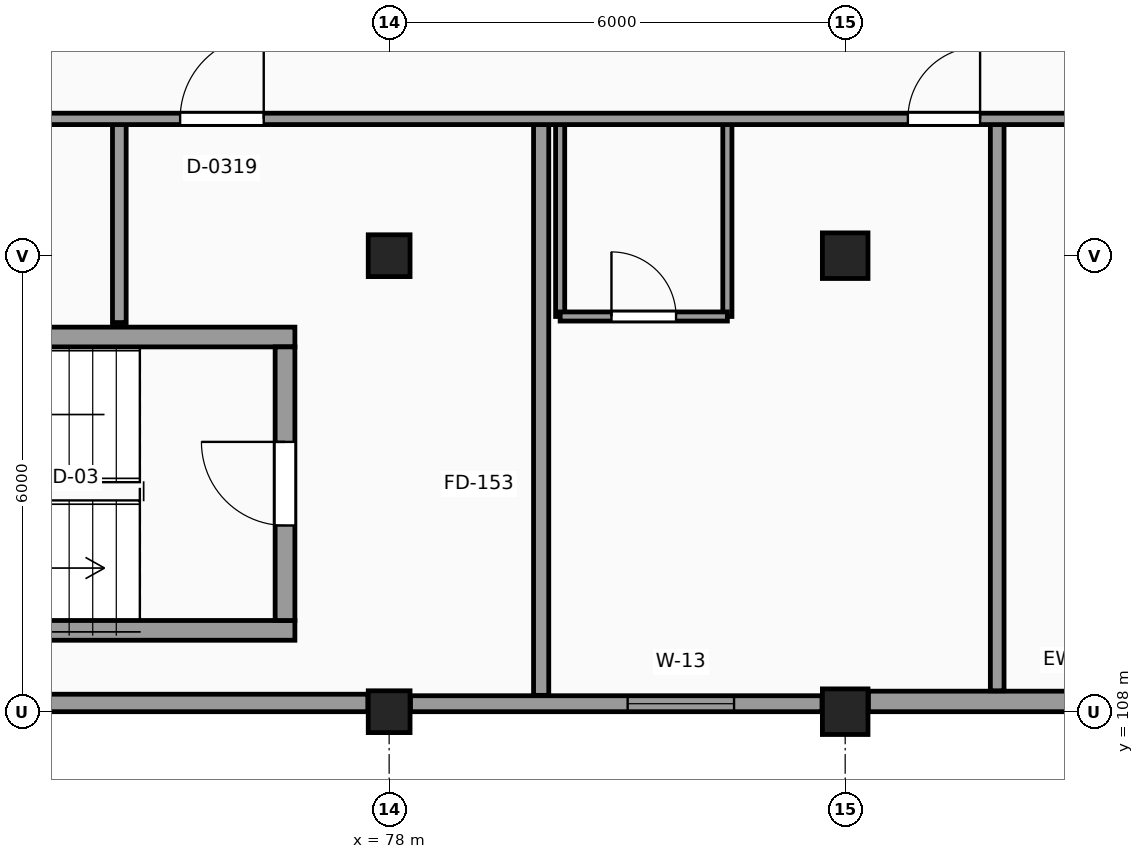
"""IFC4 building model, lengths in metres.
Left out: names, types, materials, properties, quantities, classifications, styles, units other than length and angle.
Written with IfcOpenShell. Run it as: python <this file> out.ifc"""

import sys

from ifc_helpers import new_model, si_unit, direction, frame, frame_2d, origin, origin_2d, place, context, subcontext, project, spatial, rectangle, extrude, element, fill, save


model = new_model("IFC4")
c1 = context("Model", 3, precision=1e-05, world=origin(), true_north=direction((0.0, 1.0)))
c2 = subcontext(c1, "Body", "Model", "MODEL_VIEW")
j1 = project(units=[si_unit("LENGTHUNIT", "METRE"), si_unit("PLANEANGLEUNIT", "RADIAN")], contexts=[c1])
p1 = place(None, origin())
s1 = spatial("IfcSite", under=j1, at=p1, CompositionType="ELEMENT")
p2 = place(p1, origin())
s2 = spatial("IfcBuilding", under=s1, at=p2, CompositionType="ELEMENT")
p3 = place(p2, frame((0.0, 0.0, 31.5)))
s3 = spatial("IfcBuildingStorey", under=s2, at=p3, CompositionType="ELEMENT", Elevation=31.5)
for number, where, z_axis, x_axis in (
    (1, (78.0, 108.0, 0.0), (0.0, 0.0, 1.0), (1.0, 0.0, 0.0)),
    (2, (78.0, 114.0, 0.0), (0.0, 0.0, 1.0), (1.0, 0.0, 0.0)),
):
    element("IfcColumn", number, at=place(p3, frame(where, z_axis=z_axis, x_axis=x_axis)), inside=s3, PredefinedType="COLUMN", context=c2, shape_type="SweptSolid", body=[
        extrude(rectangle(XDim=0.55, YDim=0.55, at=origin_2d()), origin(), (0.0, 0.0, 1.0), 3.3),
    ])
for number, where, z_axis, x_axis in (
    (3, (84.0, 108.0, 0.0), (0.0, 0.0, 1.0), (1.0, 0.0, 0.0)),
    (4, (84.0, 114.0, 0.0), (0.0, 0.0, 1.0), (1.0, 0.0, 0.0)),
):
    element("IfcColumn", number, at=place(p3, frame(where, z_axis=z_axis, x_axis=x_axis)), inside=s3, PredefinedType="COLUMN", context=c2, shape_type="SweptSolid", body=[
        extrude(rectangle(XDim=0.6, YDim=0.6, at=origin_2d()), origin(), (0.0, 0.0, 1.0), 3.3),
    ])
p4 = place(p3, frame((72.305, 108.115, 0.0), z_axis=(0.0, 0.0, 1.0), x_axis=(1.0, 0.0, 0.0)))
e5 = element("IfcWall", 5, at=p4, inside=s3, PredefinedType="SOLIDWALL", context=c2, shape_type="SweptSolid", body=[
    extrude(rectangle(XDim=5.415, YDim=0.23, at=frame_2d((2.708, 0.0))), origin(), (0.0, 0.0, 1.0), 2.42),
])
p5 = place(p3, frame((78.28, 108.105, 0.0), z_axis=(0.0, 0.0, 1.0), x_axis=(1.0, 0.0, 0.0)))
e6 = element("IfcWall", 6, at=p5, inside=s3, PredefinedType="SOLIDWALL", context=c2, shape_type="SweptSolid", body=[
    extrude(rectangle(XDim=5.415, YDim=0.21, at=frame_2d((2.708, 0.0))), origin(), (0.0, 0.0, 1.0), 2.42),
])
p6 = place(p5, frame((2.858, 0.0, 0.8)))
e7 = element("IfcOpeningElement", 7, at=p6, cuts=e6, PredefinedType="OPENING", context=c2, shape_type="SweptSolid", body=[
    extrude(rectangle(XDim=1.4, YDim=1.4, at=frame_2d((0.7, 0.7))), frame((0.0, 0.115, 0.0), z_axis=(0.0, -1.0, 0.0), x_axis=(1.0, 0.0, 0.0)), (0.0, 0.0, 1.0), 0.23),
])
p7 = place(p3, frame((84.305, 108.135, 0.0), z_axis=(0.0, 0.0, 1.0), x_axis=(1.0, 0.0, 0.0)))
e8 = element("IfcWall", 8, at=p7, inside=s3, PredefinedType="SOLIDWALL", context=c2, shape_type="SweptSolid", body=[
    extrude(rectangle(XDim=5.415, YDim=0.27, at=frame_2d((2.708, 0.0))), origin(), (0.0, 0.0, 1.0), 2.42),
])
for number, where, z_axis, x_axis in (
    (9, (66.04, 109.07, 0.0), (0.0, 0.0, 1.0), (1.0, 0.0, 0.0)),
    (10, (66.04, 112.93, 0.0), (0.0, 0.0, 1.0), (1.0, 0.0, 0.0)),
):
    element("IfcWall", number, at=place(p3, frame(where, z_axis=z_axis, x_axis=x_axis)), inside=s3, PredefinedType="SHEAR", context=c2, shape_type="SweptSolid", body=[
        extrude(rectangle(XDim=10.72, YDim=0.26, at=frame_2d((5.36, 0.0))), origin(), (0.0, 0.0, 1.0), 3.3),
    ])
p8 = place(p3, frame((76.63, 109.2, 0.0), z_axis=(0.0, 0.0, 1.0), x_axis=(0.0, 1.0, 0.0)))
e11 = element("IfcWall", 11, at=p8, inside=s3, PredefinedType="SHEAR", context=c2, shape_type="SweptSolid", body=[
    extrude(rectangle(XDim=3.6, YDim=0.26, at=frame_2d((1.8, 0.0))), origin(), (0.0, 0.0, 1.0), 3.3),
])
p9 = place(p8, frame((1.25, 0.0, 0.0)))
e12 = element("IfcOpeningElement", 12, at=p9, cuts=e11, PredefinedType="OPENING", context=c2, shape_type="SweptSolid", body=[
    extrude(rectangle(XDim=1.1, YDim=2.15, at=frame_2d((0.55, 1.075))), frame((0.0, 0.14, 0.0), z_axis=(0.0, -1.0, 0.0), x_axis=(1.0, 0.0, 0.0)), (0.0, 0.0, 1.0), 0.28),
])
p10 = place(p3, frame((74.45, 113.12, 0.0), z_axis=(0.0, 0.0, 1.0), x_axis=(0.0, 1.0, 0.0)))
e13 = element("IfcWall", 13, at=p10, inside=s3, PredefinedType="PARTITIONING", context=c2, shape_type="SweptSolid", body=[
    extrude(rectangle(XDim=2.68, YDim=0.18, at=frame_2d((1.34, 0.0))), origin(), (0.0, 0.0, 1.0), 3.07),
])
p11 = place(p3, frame((80.0, 108.215, 0.0), z_axis=(0.0, 0.0, 1.0), x_axis=(0.0, 1.0, 0.0)))
e14 = element("IfcWall", 14, at=p11, inside=s3, PredefinedType="PARTITIONING", context=c2, shape_type="SweptSolid", body=[
    extrude(rectangle(XDim=7.585, YDim=0.2, at=frame_2d((3.792, 0.0))), origin(), (0.0, 0.0, 1.0), 3.07),
])
for number, where, z_axis, x_axis in (
    (15, (80.25, 113.2, 0.0), (0.0, 0.0, 1.0), (0.0, 1.0, 0.0)),
    (16, (82.45, 113.2, 0.0), (0.0, 0.0, 1.0), (0.0, 1.0, 0.0)),
):
    element("IfcWall", number, at=place(p3, frame(where, z_axis=z_axis, x_axis=x_axis)), inside=s3, PredefinedType="PARTITIONING", context=c2, shape_type="SweptSolid", body=[
        extrude(rectangle(XDim=2.6, YDim=0.12, at=frame_2d((1.3, 0.0))), origin(), (0.0, 0.0, 1.0), 3.07),
    ])
p12 = place(p3, frame((86.0, 108.275, 0.0), z_axis=(0.0, 0.0, 1.0), x_axis=(0.0, 1.0, 0.0)))
e17 = element("IfcWall", 17, at=p12, inside=s3, PredefinedType="PARTITIONING", context=c2, shape_type="SweptSolid", body=[
    extrude(rectangle(XDim=7.525, YDim=0.18, at=frame_2d((3.763, 0.0))), origin(), (0.0, 0.0, 1.0), 3.07),
])
p13 = place(p3, frame((80.25, 113.2, 0.0), z_axis=(0.0, 0.0, 1.0), x_axis=(1.0, 0.0, 0.0)))
e18 = element("IfcWall", 18, at=p13, inside=s3, PredefinedType="PARTITIONING", context=c2, shape_type="SweptSolid", body=[
    extrude(rectangle(XDim=2.2, YDim=0.12, at=frame_2d((1.1, 0.0))), origin(), (0.0, 0.0, 1.0), 3.07),
])
p14 = place(p13, frame((0.675, 0.0, 0.0)))
e19 = element("IfcOpeningElement", 19, at=p14, cuts=e18, PredefinedType="OPENING", context=c2, shape_type="SweptSolid", body=[
    extrude(rectangle(XDim=0.85, YDim=2.1, at=frame_2d((0.425, 1.05))), frame((0.0, 0.07, 0.0), z_axis=(0.0, -1.0, 0.0), x_axis=(1.0, 0.0, 0.0)), (0.0, 0.0, 1.0), 0.14),
])
p15 = place(p3, frame((66.215, 115.8, 0.0), z_axis=(0.0, 0.0, 1.0), x_axis=(1.0, 0.0, 0.0)))
e20 = element("IfcWall", 20, at=p15, inside=s3, PredefinedType="PARTITIONING", context=c2, shape_type="SweptSolid", body=[
    extrude(rectangle(XDim=103.585, YDim=0.15, at=frame_2d((51.792, 0.0))), origin(), (0.0, 0.0, 1.0), 3.07),
])
p16 = place(p15, frame((80.185, 0.0, 0.0)))
e21 = element("IfcOpeningElement", 21, at=p16, cuts=e20, PredefinedType="OPENING", context=c2, shape_type="SweptSolid", body=[
    extrude(rectangle(XDim=1.2, YDim=2.2, at=frame_2d((0.6, 1.1))), frame((0.0, 0.085, 0.0), z_axis=(0.0, -1.0, 0.0), x_axis=(1.0, 0.0, 0.0)), (0.0, 0.0, 1.0), 0.17),
])
p17 = place(p15, frame((50.185, 0.0, 0.0)))
e22 = element("IfcOpeningElement", 22, at=p17, cuts=e20, PredefinedType="OPENING", context=c2, shape_type="SweptSolid", body=[
    extrude(rectangle(XDim=1.2, YDim=2.2, at=frame_2d((0.6, 1.1))), frame((0.0, 0.085, 0.0), z_axis=(0.0, -1.0, 0.0), x_axis=(1.0, 0.0, 0.0)), (0.0, 0.0, 1.0), 0.17),
])
p18 = place(p15, frame((9.035, 0.0, 0.0)))
e23 = element("IfcOpeningElement", 23, at=p18, cuts=e20, PredefinedType="OPENING", context=c2, shape_type="SweptSolid", body=[
    extrude(rectangle(XDim=1.1, YDim=2.15, at=frame_2d((0.55, 1.075))), frame((0.0, 0.085, 0.0), z_axis=(0.0, -1.0, 0.0), x_axis=(1.0, 0.0, 0.0)), (0.0, 0.0, 1.0), 0.17),
])
p19 = place(p15, frame((55.335, 0.0, 0.0)))
e24 = element("IfcOpeningElement", 24, at=p19, cuts=e20, PredefinedType="OPENING", context=c2, shape_type="SweptSolid", body=[
    extrude(rectangle(XDim=1.0, YDim=2.15, at=frame_2d((0.5, 1.075))), frame((0.0, 0.085, 0.0), z_axis=(0.0, -1.0, 0.0), x_axis=(1.0, 0.0, 0.0)), (0.0, 0.0, 1.0), 0.17),
])
p20 = place(p15, frame((62.305, 0.0, 0.0)))
e25 = element("IfcOpeningElement", 25, at=p20, cuts=e20, PredefinedType="OPENING", context=c2, shape_type="SweptSolid", body=[
    extrude(rectangle(XDim=0.96, YDim=2.15, at=frame_2d((0.48, 1.075))), frame((0.0, 0.085, 0.0), z_axis=(0.0, -1.0, 0.0), x_axis=(1.0, 0.0, 0.0)), (0.0, 0.0, 1.0), 0.17),
])
p21 = place(p15, frame((31.985, 0.0, 0.0)))
e26 = element("IfcOpeningElement", 26, at=p21, cuts=e20, PredefinedType="OPENING", context=c2, shape_type="SweptSolid", body=[
    extrude(rectangle(XDim=1.6, YDim=2.25, at=frame_2d((0.8, 1.125))), frame((0.0, 0.085, 0.0), z_axis=(0.0, -1.0, 0.0), x_axis=(1.0, 0.0, 0.0)), (0.0, 0.0, 1.0), 0.17),
])
p22 = place(p15, frame((18.61, 0.0, 0.0)))
e27 = element("IfcOpeningElement", 27, at=p22, cuts=e20, PredefinedType="OPENING", context=c2, shape_type="SweptSolid", body=[
    extrude(rectangle(XDim=0.95, YDim=2.1, at=frame_2d((0.475, 1.05))), frame((0.0, 0.085, 0.0), z_axis=(0.0, -1.0, 0.0), x_axis=(1.0, 0.0, 0.0)), (0.0, 0.0, 1.0), 0.17),
])
p23 = place(p15, frame((84.51, 0.0, 0.0)))
e28 = element("IfcOpeningElement", 28, at=p23, cuts=e20, PredefinedType="OPENING", context=c2, shape_type="SweptSolid", body=[
    extrude(rectangle(XDim=0.95, YDim=2.1, at=frame_2d((0.475, 1.05))), frame((0.0, 0.085, 0.0), z_axis=(0.0, -1.0, 0.0), x_axis=(1.0, 0.0, 0.0)), (0.0, 0.0, 1.0), 0.17),
])
p24 = place(p6, origin())
e29 = element("IfcWindow", 29, at=p24, inside=s3, PartitioningType="SINGLE_PANEL", PredefinedType="WINDOW", context=c2, shape_type="SweptSolid", body=[
    extrude(rectangle(XDim=1.4, YDim=1.4, at=frame_2d((0.7, 0.7))), frame((0.0, 0.03, 0.0), z_axis=(0.0, -1.0, 0.0), x_axis=(1.0, 0.0, 0.0)), (0.0, 0.0, 1.0), 0.06),
])
fill(e7, e29)
p25 = place(p9, origin())
e30 = element("IfcDoor", 30, at=p25, inside=s3, OperationType="SINGLE_SWING_RIGHT", PredefinedType="DOOR", context=c2, shape_type="SweptSolid", body=[
    extrude(rectangle(XDim=1.1, YDim=2.15, at=frame_2d((0.55, 1.075))), frame((0.0, 0.025, 0.0), z_axis=(0.0, -1.0, 0.0), x_axis=(1.0, 0.0, 0.0)), (0.0, 0.0, 1.0), 0.05),
])
fill(e12, e30)
p26 = place(p18, origin())
e31 = element("IfcDoor", 31, at=p26, inside=s3, OperationType="SINGLE_SWING_RIGHT", PredefinedType="DOOR", context=c2, shape_type="SweptSolid", body=[
    extrude(rectangle(XDim=1.1, YDim=2.15, at=frame_2d((0.55, 1.075))), frame((0.0, 0.025, 0.0), z_axis=(0.0, -1.0, 0.0), x_axis=(1.0, 0.0, 0.0)), (0.0, 0.0, 1.0), 0.05),
])
fill(e23, e31)
p27 = place(p14, origin())
e32 = element("IfcDoor", 32, at=p27, inside=s3, OperationType="SINGLE_SWING_LEFT", PredefinedType="DOOR", context=c2, shape_type="SweptSolid", body=[
    extrude(rectangle(XDim=0.85, YDim=2.1, at=frame_2d((0.425, 1.05))), frame((0.0, 0.025, 0.0), z_axis=(0.0, -1.0, 0.0), x_axis=(1.0, 0.0, 0.0)), (0.0, 0.0, 1.0), 0.05),
])
fill(e19, e32)
p28 = place(p22, origin())
e33 = element("IfcDoor", 33, at=p28, inside=s3, OperationType="SINGLE_SWING_RIGHT", PredefinedType="DOOR", context=c2, shape_type="SweptSolid", body=[
    extrude(rectangle(XDim=0.95, YDim=2.1, at=frame_2d((0.475, 1.05))), frame((0.0, 0.025, 0.0), z_axis=(0.0, -1.0, 0.0), x_axis=(1.0, 0.0, 0.0)), (0.0, 0.0, 1.0), 0.05),
])
fill(e27, e33)
save(model, sys.argv[1])
